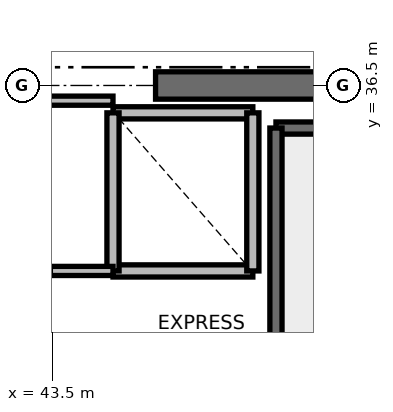
"""IFC4 building model, lengths in metres.
Left out: names, types, materials, properties, quantities, classifications, styles, units other than length and angle.
Written with IfcOpenShell. Run it as: python <this file> out.ifc"""

import sys

from ifc_helpers import new_model, si_unit, direction, frame, frame_2d, origin, place, context, subcontext, project, spatial, rectangle, extrude, element, save


model = new_model("IFC4")
c1 = context("Model", 3, precision=1e-05, world=origin(), true_north=direction((0.0, 1.0)))
c2 = subcontext(c1, "Body", "Model", "MODEL_VIEW")
j1 = project(units=[si_unit("LENGTHUNIT", "METRE"), si_unit("PLANEANGLEUNIT", "RADIAN")], contexts=[c1])
p1 = place(None, origin())
s1 = spatial("IfcSite", under=j1, at=p1, CompositionType="ELEMENT")
p2 = place(p1, origin())
s2 = spatial("IfcBuilding", under=s1, at=p2, CompositionType="ELEMENT")
p3 = place(p2, frame((0.0, 0.0, 283.2)))
s3 = spatial("IfcBuildingStorey", under=s2, at=p3, CompositionType="ELEMENT", Elevation=283.2)
p4 = place(p3, frame((45.2, 36.5, 0.0), z_axis=(0.0, 0.0, 1.0), x_axis=(1.0, 0.0, 0.0)))
e1 = element("IfcWall", 1, at=p4, inside=s3, PredefinedType="SHEAR", context=c2, shape_type="SweptSolid", body=[
    extrude(rectangle(XDim=5.8, YDim=0.45, at=frame_2d((2.9, 0.0))), origin(), (0.0, 0.0, 1.0), 3.785),
])
p5 = place(p3, frame((47.18, 35.8, 0.0), z_axis=(0.0, 0.0, 1.0), x_axis=(1.0, 0.0, 0.0)))
e2 = element("IfcWall", 2, at=p5, inside=s3, PredefinedType="SOLIDWALL", context=c2, shape_type="SweptSolid", body=[
    extrude(rectangle(XDim=3.12, YDim=0.2, at=frame_2d((1.56, 0.0))), origin(), (0.0, 0.0, 1.0), 3.785),
])
p6 = place(p3, frame((47.18, 27.62, 0.0), z_axis=(0.0, 0.0, 1.0), x_axis=(0.0, 1.0, 0.0)))
e3 = element("IfcWall", 3, at=p6, inside=s3, PredefinedType="SOLIDWALL", context=c2, shape_type="SweptSolid", body=[
    extrude(rectangle(XDim=8.18, YDim=0.2, at=frame_2d((4.09, 0.0))), origin(), (0.0, 0.0, 1.0), 3.785),
])
p7 = place(p3, frame((44.5, 33.45, 0.0), z_axis=(0.0, 0.0, 1.0), x_axis=(1.0, 0.0, 0.0)))
e4 = element("IfcWall", 4, at=p7, inside=s3, PredefinedType="SOLIDWALL", context=c2, shape_type="SweptSolid", body=[
    extrude(rectangle(XDim=2.3, YDim=0.2, at=frame_2d((1.15, 0.0))), origin(), (0.0, 0.0, 1.0), 3.785),
])
p8 = place(p3, frame((46.8, 36.05, 0.0), z_axis=(0.0, 0.0, 1.0), x_axis=(-1.0, 0.0, 0.0)))
e5 = element("IfcWall", 5, at=p8, inside=s3, PredefinedType="SOLIDWALL", context=c2, shape_type="SweptSolid", body=[
    extrude(rectangle(XDim=2.3, YDim=0.2, at=frame_2d((1.15, 0.0))), origin(), (0.0, 0.0, 1.0), 2.865),
])
p9 = place(p3, frame((44.5, 36.05, 0.0), z_axis=(0.0, 0.0, 1.0), x_axis=(0.0, -1.0, 0.0)))
e6 = element("IfcWall", 6, at=p9, inside=s3, PredefinedType="SOLIDWALL", context=c2, shape_type="SweptSolid", body=[
    extrude(rectangle(XDim=2.6, YDim=0.2, at=frame_2d((1.3, 0.0))), origin(), (0.0, 0.0, 1.0), 2.865),
])
p10 = place(p3, frame((46.8, 33.45, 0.0), z_axis=(0.0, 0.0, 1.0), x_axis=(0.0, 1.0, 0.0)))
e7 = element("IfcWall", 7, at=p10, inside=s3, PredefinedType="SOLIDWALL", context=c2, shape_type="SweptSolid", body=[
    extrude(rectangle(XDim=2.6, YDim=0.2, at=frame_2d((1.3, 0.0))), origin(), (0.0, 0.0, 1.0), 3.785),
])
p11 = place(p3, frame((41.56, 36.25, 0.0), z_axis=(0.0, 0.0, 1.0), x_axis=(1.0, 0.0, 0.0)))
e8 = element("IfcWall", 8, at=p11, inside=s3, PredefinedType="PARTITIONING", context=c2, shape_type="SweptSolid", body=[
    extrude(rectangle(XDim=2.94, YDim=0.15, at=frame_2d((1.47, 0.0))), origin(), (0.0, 0.0, 1.0), 2.85),
])
p12 = place(p3, frame((41.56, 33.45, 0.0), z_axis=(0.0, 0.0, 1.0), x_axis=(1.0, 0.0, 0.0)))
e9 = element("IfcWall", 9, at=p12, inside=s3, PredefinedType="PARTITIONING", context=c2, shape_type="SweptSolid", body=[
    extrude(rectangle(XDim=2.94, YDim=0.15, at=frame_2d((1.47, 0.0))), origin(), (0.0, 0.0, 1.0), 2.85),
])
p13 = place(p12, frame((1.03, 0.0, 0.0)))
e10 = element("IfcOpeningElement", 10, at=p13, cuts=e9, PredefinedType="OPENING", context=c2, shape_type="SweptSolid", body=[
    extrude(rectangle(XDim=0.88, YDim=2.1, at=frame_2d((0.44, 1.05))), frame((0.0, 0.075, 0.0), z_axis=(0.0, -1.0, 0.0), x_axis=(1.0, 0.0, 0.0)), (0.0, 0.0, 1.0), 0.15),
])
save(model, sys.argv[1])
